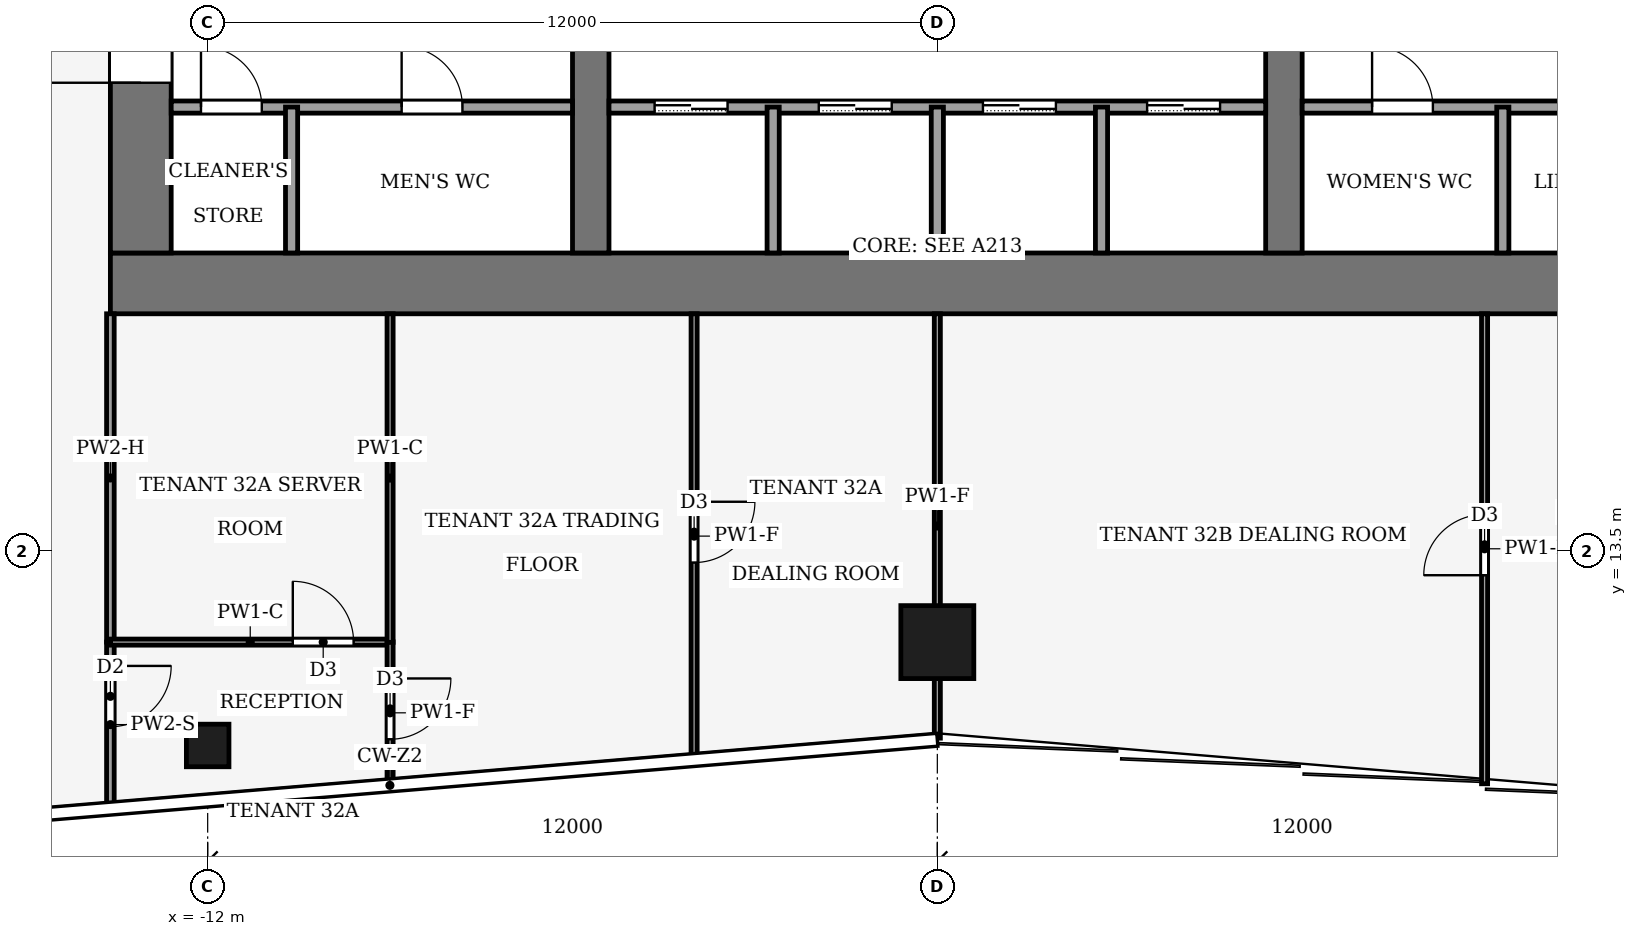
"""IFC4 building model, lengths in metres.
Left out: names, types, materials, properties, quantities, classifications, styles, units other than length and angle.
Written with IfcOpenShell. Run it as: python <this file> out.ifc"""

import sys

from ifc_helpers import new_model, si_unit, direction, frame, frame_2d, origin, origin_2d, place, context, subcontext, project, spatial, rectangle, hollow_rectangle, extrude, element, fill, save


model = new_model("IFC4")
c1 = context("Model", 3, precision=1e-05, world=origin(), true_north=direction((0.0, 1.0)))
c2 = subcontext(c1, "Body", "Model", "MODEL_VIEW")
j1 = project(units=[si_unit("LENGTHUNIT", "METRE"), si_unit("PLANEANGLEUNIT", "RADIAN")], contexts=[c1])
p1 = place(None, origin())
s1 = spatial("IfcSite", under=j1, at=p1, CompositionType="ELEMENT")
p2 = place(p1, origin())
s2 = spatial("IfcBuilding", under=s1, at=p2, CompositionType="ELEMENT")
p3 = place(p2, frame((0.0, 0.0, 142.0)))
s3 = spatial("IfcBuildingStorey", under=s2, at=p3, CompositionType="ELEMENT", Elevation=142.0)
p4 = place(p3, frame((-13.6, 17.9, -0.13), z_axis=(0.0, 0.0, 1.0), x_axis=(1.0, 0.0, 0.0)))
e1 = element("IfcWall", 1, at=p4, inside=s3, PredefinedType="SHEAR", context=c2, shape_type="SweptSolid", body=[
    extrude(rectangle(XDim=27.2, YDim=1.0, at=frame_2d((13.6, 0.0))), origin(), (0.0, 0.0, 1.0), 4.0),
])
p5 = place(p3, frame((-13.1, 18.4, -0.13), z_axis=(0.0, 0.0, 1.0), x_axis=(0.0, 1.0, 0.0)))
e2 = element("IfcWall", 2, at=p5, inside=s3, PredefinedType="SHEAR", context=c2, shape_type="SweptSolid", body=[
    extrude(rectangle(XDim=19.2, YDim=1.0, at=frame_2d((9.6, 0.0))), origin(), (0.0, 0.0, 1.0), 4.0),
])
p6 = place(p5, frame((2.8, 0.0, 0.13)))
e3 = element("IfcOpeningElement", 3, at=p6, cuts=e2, PredefinedType="OPENING", context=c2, shape_type="SweptSolid", body=[
    extrude(rectangle(XDim=2.4, YDim=2.4, at=frame_2d((1.2, 1.2))), frame((0.0, 0.51, 0.0), z_axis=(0.0, -1.0, 0.0), x_axis=(1.0, 0.0, 0.0)), (0.0, 0.0, 1.0), 1.02),
])
p7 = place(p5, frame((13.4, 0.0, 0.13)))
e4 = element("IfcOpeningElement", 4, at=p7, cuts=e2, PredefinedType="OPENING", context=c2, shape_type="SweptSolid", body=[
    extrude(rectangle(XDim=1.4, YDim=2.2, at=frame_2d((0.7, 1.1))), frame((0.0, 0.51, 0.0), z_axis=(0.0, -1.0, 0.0), x_axis=(1.0, 0.0, 0.0)), (0.0, 0.0, 1.0), 1.02),
])
p8 = place(p3, frame((-5.7, 18.4, -0.13), z_axis=(0.0, 0.0, 1.0), x_axis=(0.0, 1.0, 0.0)))
e5 = element("IfcWall", 5, at=p8, inside=s3, PredefinedType="SHEAR", context=c2, shape_type="SweptSolid", body=[
    extrude(rectangle(XDim=19.2, YDim=0.6, at=frame_2d((9.6, 0.0))), origin(), (0.0, 0.0, 1.0), 4.0),
])
p9 = place(p8, frame((8.35, 0.0, 0.13)))
e6 = element("IfcOpeningElement", 6, at=p9, cuts=e5, PredefinedType="OPENING", context=c2, shape_type="SweptSolid", body=[
    extrude(rectangle(XDim=0.9, YDim=2.1, at=frame_2d((0.45, 1.05))), frame((0.0, 0.31, 0.0), z_axis=(0.0, -1.0, 0.0), x_axis=(1.0, 0.0, 0.0)), (0.0, 0.0, 1.0), 0.62),
])
p10 = place(p3, frame((5.7, 18.4, -0.13), z_axis=(0.0, 0.0, 1.0), x_axis=(0.0, 1.0, 0.0)))
e7 = element("IfcWall", 7, at=p10, inside=s3, PredefinedType="SHEAR", context=c2, shape_type="SweptSolid", body=[
    extrude(rectangle(XDim=19.2, YDim=0.6, at=frame_2d((9.6, 0.0))), origin(), (0.0, 0.0, 1.0), 4.0),
])
p11 = place(p10, frame((13.3, 0.0, 0.13)))
e8 = element("IfcOpeningElement", 8, at=p11, cuts=e7, PredefinedType="OPENING", context=c2, shape_type="SweptSolid", body=[
    extrude(rectangle(XDim=2.4, YDim=2.4, at=frame_2d((1.2, 1.2))), frame((0.0, 0.31, 0.0), z_axis=(0.0, -1.0, 0.0), x_axis=(1.0, 0.0, 0.0)), (0.0, 0.0, 1.0), 0.62),
])
p12 = place(p3, frame((0.0, 12.0, 0.0), z_axis=(0.0, 0.0, 1.0), x_axis=(1.0, 0.0, 0.0)))
e9 = element("IfcColumn", 9, at=p12, inside=s3, PredefinedType="COLUMN", context=c2, shape_type="SweptSolid", body=[
    extrude(hollow_rectangle(XDim=1.2, YDim=1.2, WallThickness=0.07, at=origin_2d()), origin(), (0.0, 0.0, 1.0), 4.0),
])
p13 = place(p3, frame((-12.0, 10.3, 0.0), z_axis=(0.0, 0.0, 1.0), x_axis=(1.0, 0.0, 0.0)))
e10 = element("IfcColumn", 10, at=p13, inside=s3, PredefinedType="COLUMN", context=c2, shape_type="SweptSolid", body=[
    extrude(hollow_rectangle(XDim=0.7, YDim=0.7, WallThickness=0.03, at=origin_2d()), origin(), (0.0, 0.0, 1.0), 4.0),
])
p14 = place(p3, frame((-12.6, 20.8, 0.0), z_axis=(0.0, 0.0, 1.0), x_axis=(1.0, 0.0, 0.0)))
e11 = element("IfcWall", 11, at=p14, inside=s3, PredefinedType="PARTITIONING", context=c2, shape_type="SweptSolid", body=[
    extrude(rectangle(XDim=6.6, YDim=0.2, at=frame_2d((3.3, 0.0))), origin(), (0.0, 0.0, 1.0), 3.87),
])
p15 = place(p14, frame((0.49, 0.0, 0.0)))
e12 = element("IfcOpeningElement", 12, at=p15, cuts=e11, PredefinedType="OPENING", context=c2, shape_type="SweptSolid", body=[
    extrude(rectangle(XDim=1.0, YDim=2.1, at=frame_2d((0.5, 1.05))), frame((0.0, 0.11, 0.0), z_axis=(0.0, -1.0, 0.0), x_axis=(1.0, 0.0, 0.0)), (0.0, 0.0, 1.0), 0.22),
])
p16 = place(p14, frame((3.79, 0.0, 0.0)))
e13 = element("IfcOpeningElement", 13, at=p16, cuts=e11, PredefinedType="OPENING", context=c2, shape_type="SweptSolid", body=[
    extrude(rectangle(XDim=1.0, YDim=2.1, at=frame_2d((0.5, 1.05))), frame((0.0, 0.11, 0.0), z_axis=(0.0, -1.0, 0.0), x_axis=(1.0, 0.0, 0.0)), (0.0, 0.0, 1.0), 0.22),
])
p17 = place(p3, frame((-5.4, 20.8, 0.0), z_axis=(0.0, 0.0, 1.0), x_axis=(1.0, 0.0, 0.0)))
e14 = element("IfcWall", 14, at=p17, inside=s3, PredefinedType="PARTITIONING", context=c2, shape_type="SweptSolid", body=[
    extrude(rectangle(XDim=10.8, YDim=0.2, at=frame_2d((5.4, 0.0))), origin(), (0.0, 0.0, 1.0), 3.87),
])
p18 = place(p17, frame((0.75, 0.0, 0.0)))
e15 = element("IfcOpeningElement", 15, at=p18, cuts=e14, PredefinedType="OPENING", context=c2, shape_type="SweptSolid", body=[
    extrude(rectangle(XDim=1.2, YDim=2.2, at=frame_2d((0.6, 1.1))), frame((0.0, 0.11, 0.0), z_axis=(0.0, -1.0, 0.0), x_axis=(1.0, 0.0, 0.0)), (0.0, 0.0, 1.0), 0.22),
])
p19 = place(p17, frame((3.45, 0.0, 0.0)))
e16 = element("IfcOpeningElement", 16, at=p19, cuts=e14, PredefinedType="OPENING", context=c2, shape_type="SweptSolid", body=[
    extrude(rectangle(XDim=1.2, YDim=2.2, at=frame_2d((0.6, 1.1))), frame((0.0, 0.11, 0.0), z_axis=(0.0, -1.0, 0.0), x_axis=(1.0, 0.0, 0.0)), (0.0, 0.0, 1.0), 0.22),
])
p20 = place(p17, frame((6.15, 0.0, 0.0)))
e17 = element("IfcOpeningElement", 17, at=p20, cuts=e14, PredefinedType="OPENING", context=c2, shape_type="SweptSolid", body=[
    extrude(rectangle(XDim=1.2, YDim=2.2, at=frame_2d((0.6, 1.1))), frame((0.0, 0.11, 0.0), z_axis=(0.0, -1.0, 0.0), x_axis=(1.0, 0.0, 0.0)), (0.0, 0.0, 1.0), 0.22),
])
p21 = place(p17, frame((8.85, 0.0, 0.0)))
e18 = element("IfcOpeningElement", 18, at=p21, cuts=e14, PredefinedType="OPENING", context=c2, shape_type="SweptSolid", body=[
    extrude(rectangle(XDim=1.2, YDim=2.2, at=frame_2d((0.6, 1.1))), frame((0.0, 0.11, 0.0), z_axis=(0.0, -1.0, 0.0), x_axis=(1.0, 0.0, 0.0)), (0.0, 0.0, 1.0), 0.22),
])
p22 = place(p3, frame((6.0, 20.8, 0.0), z_axis=(0.0, 0.0, 1.0), x_axis=(1.0, 0.0, 0.0)))
e19 = element("IfcWall", 19, at=p22, inside=s3, PredefinedType="PARTITIONING", context=c2, shape_type="SweptSolid", body=[
    extrude(rectangle(XDim=6.6, YDim=0.2, at=frame_2d((3.3, 0.0))), origin(), (0.0, 0.0, 1.0), 3.87),
])
p23 = place(p22, frame((1.15, 0.0, 0.0)))
e20 = element("IfcOpeningElement", 20, at=p23, cuts=e19, PredefinedType="OPENING", context=c2, shape_type="SweptSolid", body=[
    extrude(rectangle(XDim=1.0, YDim=2.1, at=frame_2d((0.5, 1.05))), frame((0.0, 0.11, 0.0), z_axis=(0.0, -1.0, 0.0), x_axis=(1.0, 0.0, 0.0)), (0.0, 0.0, 1.0), 0.22),
])
p24 = place(p22, frame((4.45, 0.0, 0.0)))
e21 = element("IfcOpeningElement", 21, at=p24, cuts=e19, PredefinedType="OPENING", context=c2, shape_type="SweptSolid", body=[
    extrude(rectangle(XDim=1.0, YDim=2.1, at=frame_2d((0.5, 1.05))), frame((0.0, 0.11, 0.0), z_axis=(0.0, -1.0, 0.0), x_axis=(1.0, 0.0, 0.0)), (0.0, 0.0, 1.0), 0.22),
])
for number, where, z_axis, x_axis in (
    (22, (-10.62, 18.4, 0.0), (0.0, 0.0, 1.0), (0.0, 1.0, 0.0)),
    (23, (-2.7, 18.4, 0.0), (0.0, 0.0, 1.0), (0.0, 1.0, 0.0)),
    (24, (0.0, 18.4, 0.0), (0.0, 0.0, 1.0), (0.0, 1.0, 0.0)),
    (25, (2.7, 18.4, 0.0), (0.0, 0.0, 1.0), (0.0, 1.0, 0.0)),
    (26, (9.3, 18.4, 0.0), (0.0, 0.0, 1.0), (0.0, 1.0, 0.0)),
):
    element("IfcWall", number, at=place(p3, frame(where, z_axis=z_axis, x_axis=x_axis)), inside=s3, PredefinedType="PARTITIONING", context=c2, shape_type="SweptSolid", body=[
        extrude(rectangle(XDim=2.4, YDim=0.2, at=frame_2d((1.2, 0.0))), origin(), (0.0, 0.0, 1.0), 3.87),
    ])
p25 = place(p3, frame((-13.6, 12.0, 0.0), z_axis=(0.0, 0.0, 1.0), x_axis=(0.0, -1.0, 0.0)))
e27 = element("IfcWall", 27, at=p25, inside=s3, PredefinedType="PARTITIONING", context=c2, shape_type="SweptSolid", body=[
    extrude(rectangle(XDim=2.713, YDim=0.125, at=frame_2d((1.357, 0.0))), origin(), (0.0, 0.0, 1.0), 3.04),
])
p26 = place(p25, frame((0.392, 0.0, 0.0)))
e28 = element("IfcOpeningElement", 28, at=p26, cuts=e27, PredefinedType="OPENING", context=c2, shape_type="SweptSolid", body=[
    extrude(rectangle(XDim=1.0, YDim=2.1, at=frame_2d((0.5, 1.05))), frame((0.0, 0.073, 0.0), z_axis=(0.0, -1.0, 0.0), x_axis=(1.0, 0.0, 0.0)), (0.0, 0.0, 1.0), 0.145),
])
p27 = place(p3, frame((-13.6, 12.0, 0.0), z_axis=(0.0, 0.0, 1.0), x_axis=(0.0, 1.0, 0.0)))
e29 = element("IfcWall", 29, at=p27, inside=s3, PredefinedType="PARTITIONING", context=c2, shape_type="SweptSolid", body=[
    extrude(rectangle(XDim=5.4, YDim=0.125, at=frame_2d((2.7, 0.0))), origin(), (0.0, 0.0, 1.0), 3.14),
])
p28 = place(p3, frame((-13.6, 12.0, 0.0), z_axis=(0.0, 0.0, 1.0), x_axis=(1.0, 0.0, 0.0)))
e30 = element("IfcWall", 30, at=p28, inside=s3, PredefinedType="PARTITIONING", context=c2, shape_type="SweptSolid", body=[
    extrude(rectangle(XDim=4.6, YDim=0.1, at=frame_2d((2.3, 0.0))), origin(), (0.0, 0.0, 1.0), 3.87),
])
p29 = place(p28, frame((3.0, 0.0, 0.0)))
e31 = element("IfcOpeningElement", 31, at=p29, cuts=e30, PredefinedType="OPENING", context=c2, shape_type="SweptSolid", body=[
    extrude(rectangle(XDim=1.0, YDim=2.1, at=frame_2d((0.5, 1.05))), frame((0.0, 0.06, 0.0), z_axis=(0.0, -1.0, 0.0), x_axis=(1.0, 0.0, 0.0)), (0.0, 0.0, 1.0), 0.12),
])
p30 = place(p3, frame((-9.0, 12.004, 0.0), z_axis=(0.0, 0.0, 1.0), x_axis=(0.0, -1.0, 0.0)))
e32 = element("IfcWall", 32, at=p30, inside=s3, PredefinedType="PARTITIONING", context=c2, shape_type="SweptSolid", body=[
    extrude(rectangle(XDim=2.334, YDim=0.1, at=frame_2d((1.167, 0.0))), origin(), (0.0, 0.0, 1.0), 3.04),
])
p31 = place(p30, frame((0.602, 0.0, 0.0)))
e33 = element("IfcOpeningElement", 33, at=p31, cuts=e32, PredefinedType="OPENING", context=c2, shape_type="SweptSolid", body=[
    extrude(rectangle(XDim=1.0, YDim=2.1, at=frame_2d((0.5, 1.05))), frame((0.0, 0.06, 0.0), z_axis=(0.0, -1.0, 0.0), x_axis=(1.0, 0.0, 0.0)), (0.0, 0.0, 1.0), 0.12),
])
p32 = place(p3, frame((-9.0, 11.996, 0.0), z_axis=(0.0, 0.0, 1.0), x_axis=(0.0, 1.0, 0.0)))
e34 = element("IfcWall", 34, at=p32, inside=s3, PredefinedType="PARTITIONING", context=c2, shape_type="SweptSolid", body=[
    extrude(rectangle(XDim=5.404, YDim=0.1, at=frame_2d((2.702, 0.0))), origin(), (0.0, 0.0, 1.0), 3.87),
])
p33 = place(p3, frame((-4.0, 17.4, 0.0), z_axis=(0.0, 0.0, 1.0), x_axis=(0.0, -1.0, 0.0)))
e35 = element("IfcWall", 35, at=p33, inside=s3, PredefinedType="PARTITIONING", context=c2, shape_type="SweptSolid", body=[
    extrude(rectangle(XDim=7.313, YDim=0.1, at=frame_2d((3.657, 0.0))), origin(), (0.0, 0.0, 1.0), 3.04),
])
p34 = place(p33, frame((3.092, 0.0, 0.0)))
e36 = element("IfcOpeningElement", 36, at=p34, cuts=e35, PredefinedType="OPENING", context=c2, shape_type="SweptSolid", body=[
    extrude(rectangle(XDim=1.0, YDim=2.1, at=frame_2d((0.5, 1.05))), frame((0.0, 0.06, 0.0), z_axis=(0.0, -1.0, 0.0), x_axis=(1.0, 0.0, 0.0)), (0.0, 0.0, 1.0), 0.12),
])
p35 = place(p3, frame((0.0, 10.42, 0.0), z_axis=(0.0, 0.0, 1.0), x_axis=(0.0, 1.0, 0.0)))
e37 = element("IfcWall", 37, at=p35, inside=s3, PredefinedType="PARTITIONING", context=c2, shape_type="SweptSolid", body=[
    extrude(rectangle(XDim=6.98, YDim=0.1, at=frame_2d((3.49, 0.0))), origin(), (0.0, 0.0, 1.0), 3.04),
])
p36 = place(p3, frame((9.0, 9.67, 0.0), z_axis=(0.0, 0.0, 1.0), x_axis=(0.0, 1.0, 0.0)))
e38 = element("IfcWall", 38, at=p36, inside=s3, PredefinedType="PARTITIONING", context=c2, shape_type="SweptSolid", body=[
    extrude(rectangle(XDim=7.73, YDim=0.1, at=frame_2d((3.865, 0.0))), origin(), (0.0, 0.0, 1.0), 3.04),
])
p37 = place(p36, frame((3.43, 0.0, 0.0)))
e39 = element("IfcOpeningElement", 39, at=p37, cuts=e38, PredefinedType="OPENING", context=c2, shape_type="SweptSolid", body=[
    extrude(rectangle(XDim=1.0, YDim=2.1, at=frame_2d((0.5, 1.05))), frame((0.0, 0.06, 0.0), z_axis=(0.0, -1.0, 0.0), x_axis=(1.0, 0.0, 0.0)), (0.0, 0.0, 1.0), 0.12),
])
p38 = place(p18, origin())
e40 = element("IfcDoor", 40, at=p38, inside=s3, OperationType="SLIDING_TO_LEFT", PredefinedType="DOOR", context=c2, shape_type="SweptSolid", body=[
    extrude(rectangle(XDim=1.2, YDim=2.2, at=frame_2d((0.6, 1.1))), frame((0.0, 0.025, 0.0), z_axis=(0.0, -1.0, 0.0), x_axis=(1.0, 0.0, 0.0)), (0.0, 0.0, 1.0), 0.05),
])
fill(e15, e40)
p39 = place(p19, origin())
e41 = element("IfcDoor", 41, at=p39, inside=s3, OperationType="SLIDING_TO_LEFT", PredefinedType="DOOR", context=c2, shape_type="SweptSolid", body=[
    extrude(rectangle(XDim=1.2, YDim=2.2, at=frame_2d((0.6, 1.1))), frame((0.0, 0.025, 0.0), z_axis=(0.0, -1.0, 0.0), x_axis=(1.0, 0.0, 0.0)), (0.0, 0.0, 1.0), 0.05),
])
fill(e16, e41)
p40 = place(p20, origin())
e42 = element("IfcDoor", 42, at=p40, inside=s3, OperationType="SLIDING_TO_LEFT", PredefinedType="DOOR", context=c2, shape_type="SweptSolid", body=[
    extrude(rectangle(XDim=1.2, YDim=2.2, at=frame_2d((0.6, 1.1))), frame((0.0, 0.025, 0.0), z_axis=(0.0, -1.0, 0.0), x_axis=(1.0, 0.0, 0.0)), (0.0, 0.0, 1.0), 0.05),
])
fill(e17, e42)
p41 = place(p21, origin())
e43 = element("IfcDoor", 43, at=p41, inside=s3, OperationType="SLIDING_TO_LEFT", PredefinedType="DOOR", context=c2, shape_type="SweptSolid", body=[
    extrude(rectangle(XDim=1.2, YDim=2.2, at=frame_2d((0.6, 1.1))), frame((0.0, 0.025, 0.0), z_axis=(0.0, -1.0, 0.0), x_axis=(1.0, 0.0, 0.0)), (0.0, 0.0, 1.0), 0.05),
])
fill(e18, e43)
p42 = place(p15, origin())
e44 = element("IfcDoor", 44, at=p42, inside=s3, OperationType="SINGLE_SWING_RIGHT", PredefinedType="DOOR", context=c2, shape_type="SweptSolid", body=[
    extrude(rectangle(XDim=1.0, YDim=2.1, at=frame_2d((0.5, 1.05))), frame((0.0, 0.025, 0.0), z_axis=(0.0, -1.0, 0.0), x_axis=(1.0, 0.0, 0.0)), (0.0, 0.0, 1.0), 0.05),
])
fill(e12, e44)
p43 = place(p16, origin())
e45 = element("IfcDoor", 45, at=p43, inside=s3, OperationType="SINGLE_SWING_RIGHT", PredefinedType="DOOR", context=c2, shape_type="SweptSolid", body=[
    extrude(rectangle(XDim=1.0, YDim=2.1, at=frame_2d((0.5, 1.05))), frame((0.0, 0.025, 0.0), z_axis=(0.0, -1.0, 0.0), x_axis=(1.0, 0.0, 0.0)), (0.0, 0.0, 1.0), 0.05),
])
fill(e13, e45)
p44 = place(p23, origin())
e46 = element("IfcDoor", 46, at=p44, inside=s3, OperationType="SINGLE_SWING_LEFT", PredefinedType="DOOR", context=c2, shape_type="SweptSolid", body=[
    extrude(rectangle(XDim=1.0, YDim=2.1, at=frame_2d((0.5, 1.05))), frame((0.0, 0.025, 0.0), z_axis=(0.0, -1.0, 0.0), x_axis=(1.0, 0.0, 0.0)), (0.0, 0.0, 1.0), 0.05),
])
fill(e20, e46)
p45 = place(p6, origin())
e47 = element("IfcDoor", 47, at=p45, inside=s3, OperationType="DOUBLE_DOOR_SINGLE_SWING", PredefinedType="DOOR", context=c2, shape_type="SweptSolid", body=[
    extrude(rectangle(XDim=2.4, YDim=2.4, at=frame_2d((1.2, 1.2))), frame((0.0, 0.025, 0.0), z_axis=(0.0, -1.0, 0.0), x_axis=(1.0, 0.0, 0.0)), (0.0, 0.0, 1.0), 0.05),
])
fill(e3, e47)
p46 = place(p26, origin())
e48 = element("IfcDoor", 48, at=p46, inside=s3, OperationType="SINGLE_SWING_LEFT", PredefinedType="DOOR", context=c2, shape_type="SweptSolid", body=[
    extrude(rectangle(XDim=1.0, YDim=2.1, at=frame_2d((0.5, 1.05))), frame((0.0, 0.025, 0.0), z_axis=(0.0, -1.0, 0.0), x_axis=(1.0, 0.0, 0.0)), (0.0, 0.0, 1.0), 0.05),
])
fill(e28, e48)
p47 = place(p29, origin())
e49 = element("IfcDoor", 49, at=p47, inside=s3, OperationType="SINGLE_SWING_RIGHT", PredefinedType="DOOR", context=c2, shape_type="SweptSolid", body=[
    extrude(rectangle(XDim=1.0, YDim=2.1, at=frame_2d((0.5, 1.05))), frame((0.0, 0.025, 0.0), z_axis=(0.0, -1.0, 0.0), x_axis=(1.0, 0.0, 0.0)), (0.0, 0.0, 1.0), 0.05),
])
fill(e31, e49)
p48 = place(p31, origin())
e50 = element("IfcDoor", 50, at=p48, inside=s3, OperationType="SINGLE_SWING_LEFT", PredefinedType="DOOR", context=c2, shape_type="SweptSolid", body=[
    extrude(rectangle(XDim=1.0, YDim=2.1, at=frame_2d((0.5, 1.05))), frame((0.0, 0.025, 0.0), z_axis=(0.0, -1.0, 0.0), x_axis=(1.0, 0.0, 0.0)), (0.0, 0.0, 1.0), 0.05),
])
fill(e33, e50)
p49 = place(p34, origin())
e51 = element("IfcDoor", 51, at=p49, inside=s3, OperationType="SINGLE_SWING_LEFT", PredefinedType="DOOR", context=c2, shape_type="SweptSolid", body=[
    extrude(rectangle(XDim=1.0, YDim=2.1, at=frame_2d((0.5, 1.05))), frame((0.0, 0.025, 0.0), z_axis=(0.0, -1.0, 0.0), x_axis=(1.0, 0.0, 0.0)), (0.0, 0.0, 1.0), 0.05),
])
fill(e36, e51)
p50 = place(p37, origin())
e52 = element("IfcDoor", 52, at=p50, inside=s3, OperationType="SINGLE_SWING_RIGHT", PredefinedType="DOOR", context=c2, shape_type="SweptSolid", body=[
    extrude(rectangle(XDim=1.0, YDim=2.1, at=frame_2d((0.5, 1.05))), frame((0.0, 0.025, 0.0), z_axis=(0.0, -1.0, 0.0), x_axis=(1.0, 0.0, 0.0)), (0.0, 0.0, 1.0), 0.05),
])
fill(e39, e52)
save(model, sys.argv[1])
